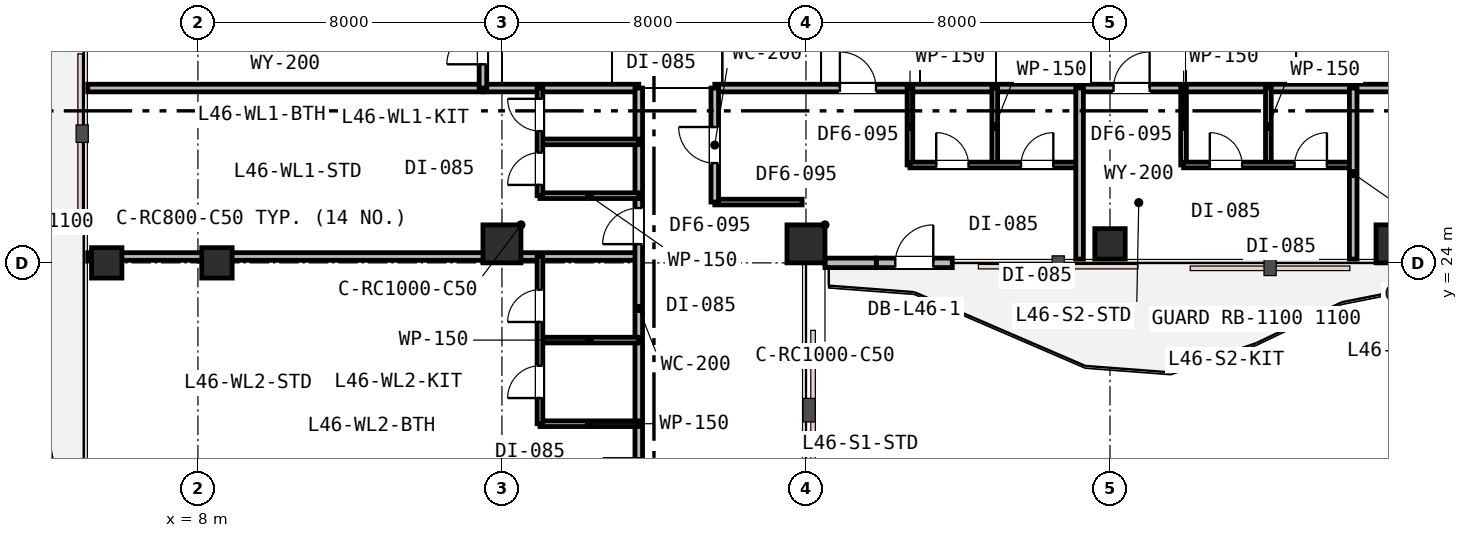
"""IFC4 building model, lengths in metres.
Left out: names, types, materials, properties, quantities, classifications, styles, units other than length and angle.
Written with IfcOpenShell. Run it as: python <this file> out.ifc"""

import sys

from ifc_helpers import new_model, si_unit, direction, frame, frame_2d, origin, origin_2d, place, context, subcontext, project, spatial, rectangle, extrude, element, fill, save


model = new_model("IFC4")
c1 = context("Model", 3, precision=1e-05, world=origin(), true_north=direction((0.0, 1.0)))
c2 = subcontext(c1, "Body", "Model", "MODEL_VIEW")
j1 = project(units=[si_unit("LENGTHUNIT", "METRE"), si_unit("PLANEANGLEUNIT", "RADIAN")], contexts=[c1])
p1 = place(None, origin())
s1 = spatial("IfcSite", under=j1, at=p1, CompositionType="ELEMENT")
p2 = place(p1, origin())
s2 = spatial("IfcBuilding", under=s1, at=p2, CompositionType="ELEMENT")
p3 = place(p2, frame((0.0, 0.0, 179.4)))
s3 = spatial("IfcBuildingStorey", under=s2, at=p3, CompositionType="ELEMENT", Elevation=179.4)
p4 = place(p3, frame((8.5, 24.0, 0.0), z_axis=(0.0, 0.0, 1.0), x_axis=(1.0, 0.0, 0.0)))
e1 = element("IfcColumn", 1, at=p4, inside=s3, PredefinedType="COLUMN", context=c2, shape_type="SweptSolid", body=[
    extrude(rectangle(XDim=0.8, YDim=0.8, at=origin_2d()), origin(), (0.0, 0.0, 1.0), 3.6),
])
for number, where, z_axis, x_axis in (
    (2, (16.0, 24.5, 0.0), (0.0, 0.0, 1.0), (1.0, 0.0, 0.0)),
    (3, (24.0, 24.5, 0.0), (0.0, 0.0, 1.0), (1.0, 0.0, 0.0)),
):
    element("IfcColumn", number, at=place(p3, frame(where, z_axis=z_axis, x_axis=x_axis)), inside=s3, PredefinedType="COLUMN", context=c2, shape_type="SweptSolid", body=[
        extrude(rectangle(XDim=1.0, YDim=1.0, at=origin_2d()), origin(), (0.0, 0.0, 1.0), 3.6),
    ])
p5 = place(p3, frame((32.0, 24.5, 0.0), z_axis=(0.0, 0.0, 1.0), x_axis=(1.0, 0.0, 0.0)))
e4 = element("IfcColumn", 4, at=p5, inside=s3, PredefinedType="COLUMN", context=c2, shape_type="SweptSolid", body=[
    extrude(rectangle(XDim=0.8, YDim=0.8, at=origin_2d()), origin(), (0.0, 0.0, 1.0), 3.6),
])
p6 = place(p3, frame((39.5, 24.5, 0.0), z_axis=(0.0, 0.0, 1.0), x_axis=(1.0, 0.0, 0.0)))
e5 = element("IfcColumn", 5, at=p6, inside=s3, PredefinedType="COLUMN", context=c2, shape_type="SweptSolid", body=[
    extrude(rectangle(XDim=1.0, YDim=1.0, at=origin_2d()), origin(), (0.0, 0.0, 1.0), 3.6),
])
p7 = place(p3, frame((5.6, 24.0, 0.0), z_axis=(0.0, 0.0, 1.0), x_axis=(1.0, 0.0, 0.0)))
e6 = element("IfcColumn", 6, at=p7, inside=s3, PredefinedType="COLUMN", context=c2, shape_type="SweptSolid", body=[
    extrude(rectangle(XDim=0.8, YDim=0.8, at=origin_2d()), origin(), (0.0, 0.0, 1.0), 3.6),
])
p8 = place(p3, frame((25.85, 24.0, 0.0), z_axis=(0.0, 0.0, 1.0), x_axis=(1.0, 0.0, 0.0)))
e7 = element("IfcWall", 7, at=p8, inside=s3, PredefinedType="STANDARD", context=c2, shape_type="SweptSolid", body=[
    extrude(rectangle(XDim=2.0, YDim=0.25, at=frame_2d((1.0, 0.0))), origin(), (0.0, 0.0, 1.0), 3.02),
])
p9 = place(p8, frame((0.5, 0.0, 0.0)))
e8 = element("IfcOpeningElement", 8, at=p9, cuts=e7, PredefinedType="OPENING", context=c2, shape_type="SweptSolid", body=[
    extrude(rectangle(XDim=1.0, YDim=2.15, at=frame_2d((0.5, 1.075))), frame((0.0, 0.135, 0.0), z_axis=(0.0, -1.0, 0.0), x_axis=(1.0, 0.0, 0.0)), (0.0, 0.0, 1.0), 0.27),
])
p10 = place(p3, frame((24.5, 24.0, 0.0), z_axis=(0.0, 0.0, 1.0), x_axis=(1.0, 0.0, 0.0)))
e9 = element("IfcWall", 9, at=p10, inside=s3, PredefinedType="STANDARD", context=c2, shape_type="SweptSolid", body=[
    extrude(rectangle(XDim=1.35, YDim=0.25, at=frame_2d((0.675, 0.0))), origin(), (0.0, 0.0, 1.0), 3.02),
])
p11 = place(p3, frame((5.1, 28.6, 0.0), z_axis=(0.0, 0.0, 1.0), x_axis=(1.0, 0.0, 0.0)))
e10 = element("IfcWall", 10, at=p11, inside=s3, PredefinedType="PARTITIONING", context=c2, shape_type="SweptSolid", body=[
    extrude(rectangle(XDim=10.4, YDim=0.2, at=frame_2d((5.2, 0.0))), origin(), (0.0, 0.0, 1.0), 2.92),
])
p12 = place(p3, frame((15.5, 28.6, 0.0), z_axis=(0.0, 0.0, 1.0), x_axis=(1.0, 0.0, 0.0)))
e11 = element("IfcWall", 11, at=p12, inside=s3, PredefinedType="PARTITIONING", context=c2, shape_type="SweptSolid", body=[
    extrude(rectangle(XDim=4.1, YDim=0.2, at=frame_2d((2.05, 0.0))), origin(), (0.0, 0.0, 1.0), 2.92),
])
p13 = place(p3, frame((21.6, 28.6, 0.0), z_axis=(0.0, 0.0, 1.0), x_axis=(1.0, 0.0, 0.0)))
e12 = element("IfcWall", 12, at=p13, inside=s3, PredefinedType="PARTITIONING", context=c2, shape_type="SweptSolid", body=[
    extrude(rectangle(XDim=29.3, YDim=0.2, at=frame_2d((14.65, 0.0))), origin(), (0.0, 0.0, 1.0), 2.92),
])
p14 = place(p13, frame((3.293, 0.0, 0.0)))
e13 = element("IfcOpeningElement", 13, at=p14, cuts=e12, PredefinedType="OPENING", context=c2, shape_type="SweptSolid", body=[
    extrude(rectangle(XDim=0.95, YDim=2.15, at=frame_2d((0.475, 1.075))), frame((0.0, 0.11, 0.0), z_axis=(0.0, -1.0, 0.0), x_axis=(1.0, 0.0, 0.0)), (0.0, 0.0, 1.0), 0.22),
])
p15 = place(p13, frame((10.493, 0.0, 0.0)))
e14 = element("IfcOpeningElement", 14, at=p15, cuts=e12, PredefinedType="OPENING", context=c2, shape_type="SweptSolid", body=[
    extrude(rectangle(XDim=0.95, YDim=2.15, at=frame_2d((0.475, 1.075))), frame((0.0, 0.11, 0.0), z_axis=(0.0, -1.0, 0.0), x_axis=(1.0, 0.0, 0.0)), (0.0, 0.0, 1.0), 0.22),
])
p16 = place(p13, frame((19.375, 0.0, 0.0)))
e15 = element("IfcOpeningElement", 15, at=p16, cuts=e12, PredefinedType="OPENING", context=c2, shape_type="SweptSolid", body=[
    extrude(rectangle(XDim=0.95, YDim=2.15, at=frame_2d((0.475, 1.075))), frame((0.0, 0.11, 0.0), z_axis=(0.0, -1.0, 0.0), x_axis=(1.0, 0.0, 0.0)), (0.0, 0.0, 1.0), 0.22),
])
p17 = place(p3, frame((15.5, 28.6, 0.0), z_axis=(0.0, 0.0, 1.0), x_axis=(0.0, 1.0, 0.0)))
e16 = element("IfcWall", 16, at=p17, inside=s3, PredefinedType="PARTITIONING", context=c2, shape_type="SweptSolid", body=[
    extrude(rectangle(XDim=14.3, YDim=0.2, at=frame_2d((7.15, 0.0))), origin(), (0.0, 0.0, 1.0), 2.92),
])
p18 = place(p17, frame((0.625, 0.0, 0.0)))
e17 = element("IfcOpeningElement", 17, at=p18, cuts=e16, PredefinedType="OPENING", context=c2, shape_type="SweptSolid", body=[
    extrude(rectangle(XDim=0.95, YDim=2.15, at=frame_2d((0.475, 1.075))), frame((0.0, 0.11, 0.0), z_axis=(0.0, -1.0, 0.0), x_axis=(1.0, 0.0, 0.0)), (0.0, 0.0, 1.0), 0.22),
])
for number, where, z_axis, x_axis in (
    (18, (26.736, 26.576, 0.0), (0.0, 0.0, 1.0), (0.0, 1.0, 0.0)),
    (19, (28.968, 26.576, 0.0), (0.0, 0.0, 1.0), (0.0, 1.0, 0.0)),
):
    element("IfcWall", number, at=place(p3, frame(where, z_axis=z_axis, x_axis=x_axis)), inside=s3, PredefinedType="PARTITIONING", context=c2, shape_type="SweptSolid", body=[
        extrude(rectangle(XDim=2.024, YDim=0.15, at=frame_2d((1.012, 0.0))), origin(), (0.0, 0.0, 1.0), 3.07),
    ])
p19 = place(p3, frame((26.736, 26.576, 0.0), z_axis=(0.0, 0.0, 1.0), x_axis=(1.0, 0.0, 0.0)))
e20 = element("IfcWall", 20, at=p19, inside=s3, PredefinedType="PARTITIONING", context=c2, shape_type="SweptSolid", body=[
    extrude(rectangle(XDim=4.464, YDim=0.15, at=frame_2d((2.232, 0.0))), origin(), (0.0, 0.0, 1.0), 3.07),
])
p20 = place(p19, frame((0.691, 0.0, 0.0)))
e21 = element("IfcOpeningElement", 21, at=p20, cuts=e20, PredefinedType="OPENING", context=c2, shape_type="SweptSolid", body=[
    extrude(rectangle(XDim=0.85, YDim=2.15, at=frame_2d((0.425, 1.075))), frame((0.0, 0.085, 0.0), z_axis=(0.0, -1.0, 0.0), x_axis=(1.0, 0.0, 0.0)), (0.0, 0.0, 1.0), 0.17),
])
p21 = place(p19, frame((2.923, 0.0, 0.0)))
e22 = element("IfcOpeningElement", 22, at=p21, cuts=e20, PredefinedType="OPENING", context=c2, shape_type="SweptSolid", body=[
    extrude(rectangle(XDim=0.85, YDim=2.15, at=frame_2d((0.425, 1.075))), frame((0.0, 0.085, 0.0), z_axis=(0.0, -1.0, 0.0), x_axis=(1.0, 0.0, 0.0)), (0.0, 0.0, 1.0), 0.17),
])
p22 = place(p3, frame((31.2, 24.1, 0.0), z_axis=(0.0, 0.0, 1.0), x_axis=(0.0, 1.0, 0.0)))
e23 = element("IfcWall", 23, at=p22, inside=s3, PredefinedType="PARTITIONING", context=c2, shape_type="SweptSolid", body=[
    extrude(rectangle(XDim=4.5, YDim=0.2, at=frame_2d((2.25, 0.0))), origin(), (0.0, 0.0, 1.0), 3.02),
])
for number, where, z_axis, x_axis in (
    (24, (33.936, 26.576, 0.0), (0.0, 0.0, 1.0), (0.0, 1.0, 0.0)),
    (25, (36.168, 26.576, 0.0), (0.0, 0.0, 1.0), (0.0, 1.0, 0.0)),
):
    element("IfcWall", number, at=place(p3, frame(where, z_axis=z_axis, x_axis=x_axis)), inside=s3, PredefinedType="PARTITIONING", context=c2, shape_type="SweptSolid", body=[
        extrude(rectangle(XDim=2.024, YDim=0.15, at=frame_2d((1.012, 0.0))), origin(), (0.0, 0.0, 1.0), 3.33),
    ])
p23 = place(p3, frame((33.936, 26.576, 0.0), z_axis=(0.0, 0.0, 1.0), x_axis=(1.0, 0.0, 0.0)))
e26 = element("IfcWall", 26, at=p23, inside=s3, PredefinedType="PARTITIONING", context=c2, shape_type="SweptSolid", body=[
    extrude(rectangle(XDim=4.464, YDim=0.15, at=frame_2d((2.232, 0.0))), origin(), (0.0, 0.0, 1.0), 3.07),
])
p24 = place(p23, frame((0.691, 0.0, 0.0)))
e27 = element("IfcOpeningElement", 27, at=p24, cuts=e26, PredefinedType="OPENING", context=c2, shape_type="SweptSolid", body=[
    extrude(rectangle(XDim=0.85, YDim=2.15, at=frame_2d((0.425, 1.075))), frame((0.0, 0.085, 0.0), z_axis=(0.0, -1.0, 0.0), x_axis=(1.0, 0.0, 0.0)), (0.0, 0.0, 1.0), 0.17),
])
p25 = place(p23, frame((2.923, 0.0, 0.0)))
e28 = element("IfcOpeningElement", 28, at=p25, cuts=e26, PredefinedType="OPENING", context=c2, shape_type="SweptSolid", body=[
    extrude(rectangle(XDim=0.85, YDim=2.15, at=frame_2d((0.425, 1.075))), frame((0.0, 0.085, 0.0), z_axis=(0.0, -1.0, 0.0), x_axis=(1.0, 0.0, 0.0)), (0.0, 0.0, 1.0), 0.17),
])
p26 = place(p3, frame((38.4, 24.1, 0.0), z_axis=(0.0, 0.0, 1.0), x_axis=(0.0, 1.0, 0.0)))
e29 = element("IfcWall", 29, at=p26, inside=s3, PredefinedType="PARTITIONING", context=c2, shape_type="SweptSolid", body=[
    extrude(rectangle(XDim=4.5, YDim=0.2, at=frame_2d((2.25, 0.0))), origin(), (0.0, 0.0, 1.0), 3.02),
])
p27 = place(p3, frame((5.1, 24.168, 0.0), z_axis=(0.0, 0.0, 1.0), x_axis=(1.0, 0.0, 0.0)))
e30 = element("IfcWall", 30, at=p27, inside=s3, PredefinedType="PARTITIONING", context=c2, shape_type="SweptSolid", body=[
    extrude(rectangle(XDim=14.5, YDim=0.2, at=frame_2d((7.25, 0.0))), origin(), (0.0, 0.0, 1.0), 2.92),
])
p28 = place(p3, frame((19.6, 17.0, 0.0), z_axis=(0.0, 0.0, 1.0), x_axis=(0.0, 1.0, 0.0)))
e31 = element("IfcWall", 31, at=p28, inside=s3, PredefinedType="PARTITIONING", context=c2, shape_type="SweptSolid", body=[
    extrude(rectangle(XDim=11.6, YDim=0.2, at=frame_2d((5.8, 0.0))), origin(), (0.0, 0.0, 1.0), 2.92),
])
p29 = place(p28, frame((7.493, 0.0, 0.0)))
e32 = element("IfcOpeningElement", 32, at=p29, cuts=e31, PredefinedType="OPENING", context=c2, shape_type="SweptSolid", body=[
    extrude(rectangle(XDim=0.95, YDim=2.15, at=frame_2d((0.475, 1.075))), frame((0.0, 0.11, 0.0), z_axis=(0.0, -1.0, 0.0), x_axis=(1.0, 0.0, 0.0)), (0.0, 0.0, 1.0), 0.22),
])
p30 = place(p28, frame((0.909, 0.0, 0.0)))
e33 = element("IfcOpeningElement", 33, at=p30, cuts=e31, PredefinedType="OPENING", context=c2, shape_type="SweptSolid", body=[
    extrude(rectangle(XDim=0.95, YDim=2.15, at=frame_2d((0.475, 1.075))), frame((0.0, 0.11, 0.0), z_axis=(0.0, -1.0, 0.0), x_axis=(1.0, 0.0, 0.0)), (0.0, 0.0, 1.0), 0.22),
])
for number, where, z_axis, x_axis in (
    (34, (17.0, 25.768, 0.0), (0.0, 0.0, 1.0), (1.0, 0.0, 0.0)),
    (35, (17.0, 27.184, 0.0), (0.0, 0.0, 1.0), (1.0, 0.0, 0.0)),
):
    element("IfcWall", number, at=place(p3, frame(where, z_axis=z_axis, x_axis=x_axis)), inside=s3, PredefinedType="PARTITIONING", context=c2, shape_type="SweptSolid", body=[
        extrude(rectangle(XDim=2.6, YDim=0.15, at=frame_2d((1.3, 0.0))), origin(), (0.0, 0.0, 1.0), 3.07),
    ])
p31 = place(p3, frame((17.0, 25.768, 0.0), z_axis=(0.0, 0.0, 1.0), x_axis=(0.0, 1.0, 0.0)))
e36 = element("IfcWall", 36, at=p31, inside=s3, PredefinedType="PARTITIONING", context=c2, shape_type="SweptSolid", body=[
    extrude(rectangle(XDim=2.832, YDim=0.15, at=frame_2d((1.416, 0.0))), origin(), (0.0, 0.0, 1.0), 3.33),
])
p32 = place(p31, frame((0.283, 0.0, 0.0)))
e37 = element("IfcOpeningElement", 37, at=p32, cuts=e36, PredefinedType="OPENING", context=c2, shape_type="SweptSolid", body=[
    extrude(rectangle(XDim=0.85, YDim=2.15, at=frame_2d((0.425, 1.075))), frame((0.0, 0.085, 0.0), z_axis=(0.0, -1.0, 0.0), x_axis=(1.0, 0.0, 0.0)), (0.0, 0.0, 1.0), 0.17),
])
p33 = place(p31, frame((1.699, 0.0, 0.0)))
e38 = element("IfcOpeningElement", 38, at=p33, cuts=e36, PredefinedType="OPENING", context=c2, shape_type="SweptSolid", body=[
    extrude(rectangle(XDim=0.85, YDim=2.15, at=frame_2d((0.425, 1.075))), frame((0.0, 0.085, 0.0), z_axis=(0.0, -1.0, 0.0), x_axis=(1.0, 0.0, 0.0)), (0.0, 0.0, 1.0), 0.17),
])
for number, where, z_axis, x_axis in (
    (39, (17.0, 19.768, 0.0), (0.0, 0.0, 1.0), (1.0, 0.0, 0.0)),
    (40, (17.0, 21.968, 0.0), (0.0, 0.0, 1.0), (1.0, 0.0, 0.0)),
):
    element("IfcWall", number, at=place(p3, frame(where, z_axis=z_axis, x_axis=x_axis)), inside=s3, PredefinedType="PARTITIONING", context=c2, shape_type="SweptSolid", body=[
        extrude(rectangle(XDim=2.6, YDim=0.15, at=frame_2d((1.3, 0.0))), origin(), (0.0, 0.0, 1.0), 3.33),
    ])
p34 = place(p3, frame((17.0, 19.768, 0.0), z_axis=(0.0, 0.0, 1.0), x_axis=(0.0, 1.0, 0.0)))
e41 = element("IfcWall", 41, at=p34, inside=s3, PredefinedType="PARTITIONING", context=c2, shape_type="SweptSolid", body=[
    extrude(rectangle(XDim=4.4, YDim=0.15, at=frame_2d((2.2, 0.0))), origin(), (0.0, 0.0, 1.0), 2.92),
])
p35 = place(p34, frame((0.675, 0.0, 0.0)))
e42 = element("IfcOpeningElement", 42, at=p35, cuts=e41, PredefinedType="OPENING", context=c2, shape_type="SweptSolid", body=[
    extrude(rectangle(XDim=0.85, YDim=2.15, at=frame_2d((0.425, 1.075))), frame((0.0, 0.085, 0.0), z_axis=(0.0, -1.0, 0.0), x_axis=(1.0, 0.0, 0.0)), (0.0, 0.0, 1.0), 0.17),
])
p36 = place(p34, frame((2.677, 0.0, 0.0)))
e43 = element("IfcOpeningElement", 43, at=p36, cuts=e41, PredefinedType="OPENING", context=c2, shape_type="SweptSolid", body=[
    extrude(rectangle(XDim=0.85, YDim=2.15, at=frame_2d((0.425, 1.075))), frame((0.0, 0.085, 0.0), z_axis=(0.0, -1.0, 0.0), x_axis=(1.0, 0.0, 0.0)), (0.0, 0.0, 1.0), 0.17),
])
p37 = place(p3, frame((21.6, 25.6, 0.0), z_axis=(0.0, 0.0, 1.0), x_axis=(1.0, 0.0, 0.0)))
e44 = element("IfcWall", 44, at=p37, inside=s3, PredefinedType="PARTITIONING", context=c2, shape_type="SweptSolid", body=[
    extrude(rectangle(XDim=2.3, YDim=0.15, at=frame_2d((1.15, 0.0))), origin(), (0.0, 0.0, 1.0), 2.92),
])
p38 = place(p3, frame((21.6, 25.6, 0.0), z_axis=(0.0, 0.0, 1.0), x_axis=(0.0, 1.0, 0.0)))
e45 = element("IfcWall", 45, at=p38, inside=s3, PredefinedType="PARTITIONING", context=c2, shape_type="SweptSolid", body=[
    extrude(rectangle(XDim=3.0, YDim=0.2, at=frame_2d((1.5, 0.0))), origin(), (0.0, 0.0, 1.0), 3.07),
])
p39 = place(p38, frame((1.025, 0.0, 0.0)))
e46 = element("IfcOpeningElement", 46, at=p39, cuts=e45, PredefinedType="OPENING", context=c2, shape_type="SweptSolid", body=[
    extrude(rectangle(XDim=0.95, YDim=2.15, at=frame_2d((0.475, 1.075))), frame((0.0, 0.11, 0.0), z_axis=(0.0, -1.0, 0.0), x_axis=(1.0, 0.0, 0.0)), (0.0, 0.0, 1.0), 0.22),
])
p40 = place(p9, origin())
e47 = element("IfcDoor", 47, at=p40, inside=s3, OperationType="SINGLE_SWING_RIGHT", PredefinedType="DOOR", context=c2, shape_type="SweptSolid", body=[
    extrude(rectangle(XDim=1.0, YDim=2.15, at=frame_2d((0.5, 1.075))), frame((0.0, 0.025, 0.0), z_axis=(0.0, -1.0, 0.0), x_axis=(1.0, 0.0, 0.0)), (0.0, 0.0, 1.0), 0.05),
])
fill(e8, e47)
p41 = place(p18, origin())
e48 = element("IfcDoor", 48, at=p41, inside=s3, OperationType="SINGLE_SWING_LEFT", PredefinedType="DOOR", context=c2, shape_type="SweptSolid", body=[
    extrude(rectangle(XDim=0.95, YDim=2.15, at=frame_2d((0.475, 1.075))), frame((0.0, 0.025, 0.0), z_axis=(0.0, -1.0, 0.0), x_axis=(1.0, 0.0, 0.0)), (0.0, 0.0, 1.0), 0.05),
])
fill(e17, e48)
p42 = place(p14, origin())
e49 = element("IfcDoor", 49, at=p42, inside=s3, OperationType="SINGLE_SWING_LEFT", PredefinedType="DOOR", context=c2, shape_type="SweptSolid", body=[
    extrude(rectangle(XDim=0.95, YDim=2.15, at=frame_2d((0.475, 1.075))), frame((0.0, 0.025, 0.0), z_axis=(0.0, -1.0, 0.0), x_axis=(1.0, 0.0, 0.0)), (0.0, 0.0, 1.0), 0.05),
])
fill(e13, e49)
p43 = place(p20, origin())
e50 = element("IfcDoor", 50, at=p43, inside=s3, OperationType="SINGLE_SWING_LEFT", PredefinedType="DOOR", context=c2, shape_type="SweptSolid", body=[
    extrude(rectangle(XDim=0.85, YDim=2.15, at=frame_2d((0.425, 1.075))), frame((0.0, 0.025, 0.0), z_axis=(0.0, -1.0, 0.0), x_axis=(1.0, 0.0, 0.0)), (0.0, 0.0, 1.0), 0.05),
])
fill(e21, e50)
p44 = place(p21, origin())
e51 = element("IfcDoor", 51, at=p44, inside=s3, OperationType="SINGLE_SWING_RIGHT", PredefinedType="DOOR", context=c2, shape_type="SweptSolid", body=[
    extrude(rectangle(XDim=0.85, YDim=2.15, at=frame_2d((0.425, 1.075))), frame((0.0, 0.025, 0.0), z_axis=(0.0, -1.0, 0.0), x_axis=(1.0, 0.0, 0.0)), (0.0, 0.0, 1.0), 0.05),
])
fill(e22, e51)
p45 = place(p15, origin())
e52 = element("IfcDoor", 52, at=p45, inside=s3, OperationType="SINGLE_SWING_RIGHT", PredefinedType="DOOR", context=c2, shape_type="SweptSolid", body=[
    extrude(rectangle(XDim=0.95, YDim=2.15, at=frame_2d((0.475, 1.075))), frame((0.0, 0.025, 0.0), z_axis=(0.0, -1.0, 0.0), x_axis=(1.0, 0.0, 0.0)), (0.0, 0.0, 1.0), 0.05),
])
fill(e14, e52)
p46 = place(p24, origin())
e53 = element("IfcDoor", 53, at=p46, inside=s3, OperationType="SINGLE_SWING_LEFT", PredefinedType="DOOR", context=c2, shape_type="SweptSolid", body=[
    extrude(rectangle(XDim=0.85, YDim=2.15, at=frame_2d((0.425, 1.075))), frame((0.0, 0.025, 0.0), z_axis=(0.0, -1.0, 0.0), x_axis=(1.0, 0.0, 0.0)), (0.0, 0.0, 1.0), 0.05),
])
fill(e27, e53)
p47 = place(p25, origin())
e54 = element("IfcDoor", 54, at=p47, inside=s3, OperationType="SINGLE_SWING_RIGHT", PredefinedType="DOOR", context=c2, shape_type="SweptSolid", body=[
    extrude(rectangle(XDim=0.85, YDim=2.15, at=frame_2d((0.425, 1.075))), frame((0.0, 0.025, 0.0), z_axis=(0.0, -1.0, 0.0), x_axis=(1.0, 0.0, 0.0)), (0.0, 0.0, 1.0), 0.05),
])
fill(e28, e54)
p48 = place(p29, origin())
e55 = element("IfcDoor", 55, at=p48, inside=s3, OperationType="SINGLE_SWING_LEFT", PredefinedType="DOOR", context=c2, shape_type="SweptSolid", body=[
    extrude(rectangle(XDim=0.95, YDim=2.15, at=frame_2d((0.475, 1.075))), frame((0.0, 0.025, 0.0), z_axis=(0.0, -1.0, 0.0), x_axis=(1.0, 0.0, 0.0)), (0.0, 0.0, 1.0), 0.05),
])
fill(e32, e55)
p49 = place(p32, origin())
e56 = element("IfcDoor", 56, at=p49, inside=s3, OperationType="SINGLE_SWING_LEFT", PredefinedType="DOOR", context=c2, shape_type="SweptSolid", body=[
    extrude(rectangle(XDim=0.85, YDim=2.15, at=frame_2d((0.425, 1.075))), frame((0.0, 0.025, 0.0), z_axis=(0.0, -1.0, 0.0), x_axis=(1.0, 0.0, 0.0)), (0.0, 0.0, 1.0), 0.05),
])
fill(e37, e56)
p50 = place(p33, origin())
e57 = element("IfcDoor", 57, at=p50, inside=s3, OperationType="SINGLE_SWING_RIGHT", PredefinedType="DOOR", context=c2, shape_type="SweptSolid", body=[
    extrude(rectangle(XDim=0.85, YDim=2.15, at=frame_2d((0.425, 1.075))), frame((0.0, 0.025, 0.0), z_axis=(0.0, -1.0, 0.0), x_axis=(1.0, 0.0, 0.0)), (0.0, 0.0, 1.0), 0.05),
])
fill(e38, e57)
p51 = place(p30, origin())
e58 = element("IfcDoor", 58, at=p51, inside=s3, OperationType="SINGLE_SWING_RIGHT", PredefinedType="DOOR", context=c2, shape_type="SweptSolid", body=[
    extrude(rectangle(XDim=0.95, YDim=2.15, at=frame_2d((0.475, 1.075))), frame((0.0, 0.025, 0.0), z_axis=(0.0, -1.0, 0.0), x_axis=(1.0, 0.0, 0.0)), (0.0, 0.0, 1.0), 0.05),
])
fill(e33, e58)
p52 = place(p35, origin())
e59 = element("IfcDoor", 59, at=p52, inside=s3, OperationType="SINGLE_SWING_LEFT", PredefinedType="DOOR", context=c2, shape_type="SweptSolid", body=[
    extrude(rectangle(XDim=0.85, YDim=2.15, at=frame_2d((0.425, 1.075))), frame((0.0, 0.025, 0.0), z_axis=(0.0, -1.0, 0.0), x_axis=(1.0, 0.0, 0.0)), (0.0, 0.0, 1.0), 0.05),
])
fill(e42, e59)
p53 = place(p36, origin())
e60 = element("IfcDoor", 60, at=p53, inside=s3, OperationType="SINGLE_SWING_LEFT", PredefinedType="DOOR", context=c2, shape_type="SweptSolid", body=[
    extrude(rectangle(XDim=0.85, YDim=2.15, at=frame_2d((0.425, 1.075))), frame((0.0, 0.025, 0.0), z_axis=(0.0, -1.0, 0.0), x_axis=(1.0, 0.0, 0.0)), (0.0, 0.0, 1.0), 0.05),
])
fill(e43, e60)
p54 = place(p39, origin())
e61 = element("IfcDoor", 61, at=p54, inside=s3, OperationType="SINGLE_SWING_RIGHT", PredefinedType="DOOR", context=c2, shape_type="SweptSolid", body=[
    extrude(rectangle(XDim=0.95, YDim=2.15, at=frame_2d((0.475, 1.075))), frame((0.0, 0.025, 0.0), z_axis=(0.0, -1.0, 0.0), x_axis=(1.0, 0.0, 0.0)), (0.0, 0.0, 1.0), 0.05),
])
fill(e46, e61)
save(model, sys.argv[1])
